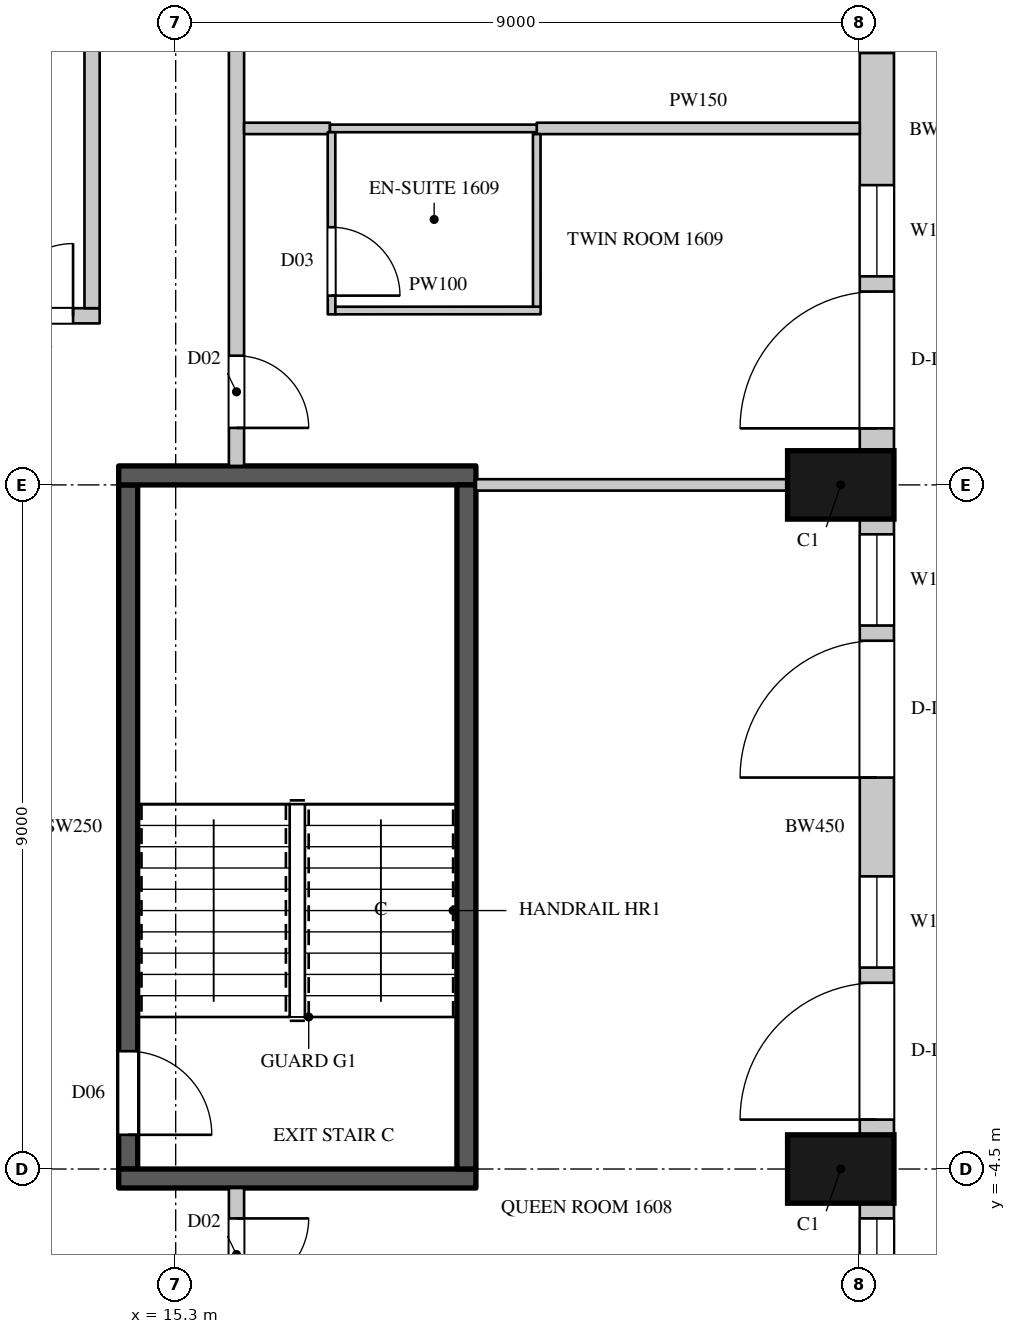
"""IFC4 building model, lengths in metres.
Left out: names, types, materials, properties, quantities, classifications, styles, units other than length and angle.
Written with IfcOpenShell. Run it as: python <this file> out.ifc"""

import sys

from ifc_helpers import new_model, si_unit, direction, frame, frame_2d, origin, origin_2d, place, context, subcontext, project, spatial, rectangle, extrude, element, fill, save


model = new_model("IFC4")
c1 = context("Model", 3, precision=1e-05, world=origin(), true_north=direction((0.0, 1.0)))
c2 = subcontext(c1, "Body", "Model", "MODEL_VIEW")
j1 = project(units=[si_unit("LENGTHUNIT", "METRE"), si_unit("PLANEANGLEUNIT", "RADIAN")], contexts=[c1])
p1 = place(None, origin())
s1 = spatial("IfcSite", under=j1, at=p1, CompositionType="ELEMENT")
p2 = place(p1, origin())
s2 = spatial("IfcBuilding", under=s1, at=p2, CompositionType="ELEMENT")
p3 = place(p2, frame((0.0, 0.0, 87.9)))
s3 = spatial("IfcBuildingStorey", under=s2, at=p3, CompositionType="ELEMENT", Elevation=87.9)
for number, where, z_axis, x_axis in (
    (1, (24.05, -4.5, 0.0), (0.0, 0.0, 1.0), (0.0, 1.0, 0.0)),
    (2, (24.05, 4.5, 0.0), (0.0, 0.0, 1.0), (0.0, 1.0, 0.0)),
):
    element("IfcColumn", number, at=place(p3, frame(where, z_axis=z_axis, x_axis=x_axis)), inside=s3, PredefinedType="COLUMN", context=c2, shape_type="SweptSolid", body=[
        extrude(rectangle(XDim=0.9, YDim=1.4, at=origin_2d()), origin(), (0.0, 0.0, 1.0), 3.6),
    ])
p4 = place(p3, frame((24.525, -13.05, 0.0), z_axis=(0.0, 0.0, 1.0), x_axis=(0.0, 1.0, 0.0)))
e3 = element("IfcWall", 3, at=p4, inside=s3, PredefinedType="SOLIDWALL", context=c2, shape_type="SweptSolid", body=[
    extrude(rectangle(XDim=8.1, YDim=0.45, at=frame_2d((4.05, 0.0))), origin(), (0.0, 0.0, 1.0), 3.3),
])
p5 = place(p4, frame((0.9, 0.0, 0.0)))
e4 = element("IfcOpeningElement", 4, at=p5, cuts=e3, PredefinedType="OPENING", context=c2, shape_type="SweptSolid", body=[
    extrude(rectangle(XDim=1.8, YDim=2.4, at=frame_2d((0.9, 1.2))), frame((0.0, 0.235, 0.0), z_axis=(0.0, -1.0, 0.0), x_axis=(1.0, 0.0, 0.0)), (0.0, 0.0, 1.0), 0.47),
])
p6 = place(p4, frame((4.7, 0.0, 0.0)))
e5 = element("IfcOpeningElement", 5, at=p6, cuts=e3, PredefinedType="OPENING", context=c2, shape_type="SweptSolid", body=[
    extrude(rectangle(XDim=1.8, YDim=2.4, at=frame_2d((0.9, 1.2))), frame((0.0, 0.235, 0.0), z_axis=(0.0, -1.0, 0.0), x_axis=(1.0, 0.0, 0.0)), (0.0, 0.0, 1.0), 0.47),
])
p7 = place(p4, frame((6.7, 0.0, 1.05)))
e6 = element("IfcOpeningElement", 6, at=p7, cuts=e3, PredefinedType="OPENING", context=c2, shape_type="SweptSolid", body=[
    extrude(rectangle(XDim=1.2, YDim=2.0, at=frame_2d((0.6, 1.0))), frame((0.0, 0.235, 0.0), z_axis=(0.0, -1.0, 0.0), x_axis=(1.0, 0.0, 0.0)), (0.0, 0.0, 1.0), 0.47),
])
p8 = place(p3, frame((24.525, -4.05, 0.0), z_axis=(0.0, 0.0, 1.0), x_axis=(0.0, 1.0, 0.0)))
e7 = element("IfcWall", 7, at=p8, inside=s3, PredefinedType="SOLIDWALL", context=c2, shape_type="SweptSolid", body=[
    extrude(rectangle(XDim=8.1, YDim=0.45, at=frame_2d((4.05, 0.0))), origin(), (0.0, 0.0, 1.0), 3.3),
])
p9 = place(p8, frame((0.2, 0.0, 0.0)))
e8 = element("IfcOpeningElement", 8, at=p9, cuts=e7, PredefinedType="OPENING", context=c2, shape_type="SweptSolid", body=[
    extrude(rectangle(XDim=1.8, YDim=2.4, at=frame_2d((0.9, 1.2))), frame((0.0, 0.235, 0.0), z_axis=(0.0, -1.0, 0.0), x_axis=(1.0, 0.0, 0.0)), (0.0, 0.0, 1.0), 0.47),
])
p10 = place(p8, frame((2.2, 0.0, 1.05)))
e9 = element("IfcOpeningElement", 9, at=p10, cuts=e7, PredefinedType="OPENING", context=c2, shape_type="SweptSolid", body=[
    extrude(rectangle(XDim=1.2, YDim=2.0, at=frame_2d((0.6, 1.0))), frame((0.0, 0.235, 0.0), z_axis=(0.0, -1.0, 0.0), x_axis=(1.0, 0.0, 0.0)), (0.0, 0.0, 1.0), 0.47),
])
p11 = place(p8, frame((4.7, 0.0, 0.0)))
e10 = element("IfcOpeningElement", 10, at=p11, cuts=e7, PredefinedType="OPENING", context=c2, shape_type="SweptSolid", body=[
    extrude(rectangle(XDim=1.8, YDim=2.4, at=frame_2d((0.9, 1.2))), frame((0.0, 0.235, 0.0), z_axis=(0.0, -1.0, 0.0), x_axis=(1.0, 0.0, 0.0)), (0.0, 0.0, 1.0), 0.47),
])
p12 = place(p8, frame((6.7, 0.0, 1.05)))
e11 = element("IfcOpeningElement", 11, at=p12, cuts=e7, PredefinedType="OPENING", context=c2, shape_type="SweptSolid", body=[
    extrude(rectangle(XDim=1.2, YDim=2.0, at=frame_2d((0.6, 1.0))), frame((0.0, 0.235, 0.0), z_axis=(0.0, -1.0, 0.0), x_axis=(1.0, 0.0, 0.0)), (0.0, 0.0, 1.0), 0.47),
])
p13 = place(p3, frame((24.525, 4.95, 0.0), z_axis=(0.0, 0.0, 1.0), x_axis=(0.0, 1.0, 0.0)))
e12 = element("IfcWall", 12, at=p13, inside=s3, PredefinedType="SOLIDWALL", context=c2, shape_type="SweptSolid", body=[
    extrude(rectangle(XDim=8.439, YDim=0.45, at=frame_2d((4.219, 0.0))), origin(), (0.0, 0.0, 1.0), 3.3),
])
p14 = place(p13, frame((0.294, 0.0, 0.0)))
e13 = element("IfcOpeningElement", 13, at=p14, cuts=e12, PredefinedType="OPENING", context=c2, shape_type="SweptSolid", body=[
    extrude(rectangle(XDim=1.8, YDim=2.4, at=frame_2d((0.9, 1.2))), frame((0.0, 0.235, 0.0), z_axis=(0.0, -1.0, 0.0), x_axis=(1.0, 0.0, 0.0)), (0.0, 0.0, 1.0), 0.47),
])
p15 = place(p13, frame((2.294, 0.0, 1.05)))
e14 = element("IfcOpeningElement", 14, at=p15, cuts=e12, PredefinedType="OPENING", context=c2, shape_type="SweptSolid", body=[
    extrude(rectangle(XDim=1.2, YDim=2.0, at=frame_2d((0.6, 1.0))), frame((0.0, 0.235, 0.0), z_axis=(0.0, -1.0, 0.0), x_axis=(1.0, 0.0, 0.0)), (0.0, 0.0, 1.0), 0.47),
])
p16 = place(p13, frame((5.232, 0.0, 1.05)))
e15 = element("IfcOpeningElement", 15, at=p16, cuts=e12, PredefinedType="OPENING", context=c2, shape_type="SweptSolid", body=[
    extrude(rectangle(XDim=2.7, YDim=2.0, at=frame_2d((1.35, 1.0))), frame((0.0, 0.235, 0.0), z_axis=(0.0, -1.0, 0.0), x_axis=(1.0, 0.0, 0.0)), (0.0, 0.0, 1.0), 0.47),
])
p17 = place(p3, frame((10.9, 6.725, 0.0), z_axis=(0.0, 0.0, 1.0), x_axis=(1.0, 0.0, 0.0)))
e16 = element("IfcWall", 16, at=p17, inside=s3, PredefinedType="PARTITIONING", context=c2, shape_type="SweptSolid", body=[
    extrude(rectangle(XDim=3.4, YDim=0.2, at=frame_2d((1.7, 0.0))), origin(), (0.0, 0.0, 1.0), 3.3),
])
p18 = place(p17, frame((2.1, 0.0, 0.0)))
e17 = element("IfcOpeningElement", 17, at=p18, cuts=e16, PredefinedType="OPENING", context=c2, shape_type="SweptSolid", body=[
    extrude(rectangle(XDim=0.95, YDim=2.2, at=frame_2d((0.475, 1.1))), frame((0.0, 0.11, 0.0), z_axis=(0.0, -1.0, 0.0), x_axis=(1.0, 0.0, 0.0)), (0.0, 0.0, 1.0), 0.22),
])
p19 = place(p3, frame((14.2, 6.825, 0.0), z_axis=(0.0, 0.0, 1.0), x_axis=(0.0, 1.0, 0.0)))
e18 = element("IfcWall", 18, at=p19, inside=s3, PredefinedType="PARTITIONING", context=c2, shape_type="SweptSolid", body=[
    extrude(rectangle(XDim=8.675, YDim=0.2, at=frame_2d((4.337, 0.0))), origin(), (0.0, 0.0, 1.0), 3.3),
])
p20 = place(p3, frame((16.1, -17.5, 0.0), z_axis=(0.0, 0.0, 1.0), x_axis=(0.0, 1.0, 0.0)))
e19 = element("IfcWall", 19, at=p20, inside=s3, PredefinedType="PARTITIONING", context=c2, shape_type="SweptSolid", body=[
    extrude(rectangle(XDim=12.75, YDim=0.2, at=frame_2d((6.375, 0.0))), origin(), (0.0, 0.0, 1.0), 3.3),
])
p21 = place(p20, frame((2.75, 0.0, 0.0)))
e20 = element("IfcOpeningElement", 20, at=p21, cuts=e19, PredefinedType="OPENING", context=c2, shape_type="SweptSolid", body=[
    extrude(rectangle(XDim=0.95, YDim=2.2, at=frame_2d((0.475, 1.1))), frame((0.0, 0.11, 0.0), z_axis=(0.0, -1.0, 0.0), x_axis=(1.0, 0.0, 0.0)), (0.0, 0.0, 1.0), 0.22),
])
p22 = place(p20, frame((6.95, 0.0, 0.0)))
e21 = element("IfcOpeningElement", 21, at=p22, cuts=e19, PredefinedType="OPENING", context=c2, shape_type="SweptSolid", body=[
    extrude(rectangle(XDim=0.95, YDim=2.2, at=frame_2d((0.475, 1.1))), frame((0.0, 0.11, 0.0), z_axis=(0.0, -1.0, 0.0), x_axis=(1.0, 0.0, 0.0)), (0.0, 0.0, 1.0), 0.22),
])
p23 = place(p20, frame((11.4, 0.0, 0.0)))
e22 = element("IfcOpeningElement", 22, at=p23, cuts=e19, PredefinedType="OPENING", context=c2, shape_type="SweptSolid", body=[
    extrude(rectangle(XDim=0.95, YDim=2.2, at=frame_2d((0.475, 1.1))), frame((0.0, 0.11, 0.0), z_axis=(0.0, -1.0, 0.0), x_axis=(1.0, 0.0, 0.0)), (0.0, 0.0, 1.0), 0.22),
])
p24 = place(p3, frame((16.1, 4.75, 0.0), z_axis=(0.0, 0.0, 1.0), x_axis=(0.0, 1.0, 0.0)))
e23 = element("IfcWall", 23, at=p24, inside=s3, PredefinedType="PARTITIONING", context=c2, shape_type="SweptSolid", body=[
    extrude(rectangle(XDim=12.65, YDim=0.2, at=frame_2d((6.325, 0.0))), origin(), (0.0, 0.0, 1.0), 3.3),
])
p25 = place(p24, frame((0.5, 0.0, 0.0)))
e24 = element("IfcOpeningElement", 24, at=p25, cuts=e23, PredefinedType="OPENING", context=c2, shape_type="SweptSolid", body=[
    extrude(rectangle(XDim=0.95, YDim=2.2, at=frame_2d((0.475, 1.1))), frame((0.0, 0.11, 0.0), z_axis=(0.0, -1.0, 0.0), x_axis=(1.0, 0.0, 0.0)), (0.0, 0.0, 1.0), 0.22),
])
p26 = place(p24, frame((6.9, 0.0, 0.0)))
e25 = element("IfcOpeningElement", 25, at=p26, cuts=e23, PredefinedType="OPENING", context=c2, shape_type="SweptSolid", body=[
    extrude(rectangle(XDim=0.95, YDim=2.2, at=frame_2d((0.475, 1.1))), frame((0.0, 0.11, 0.0), z_axis=(0.0, -1.0, 0.0), x_axis=(1.0, 0.0, 0.0)), (0.0, 0.0, 1.0), 0.22),
])
p27 = place(p3, frame((16.2, 9.19, 0.0), z_axis=(0.0, 0.0, 1.0), x_axis=(1.0, 0.0, 0.0)))
e26 = element("IfcWall", 26, at=p27, inside=s3, PredefinedType="PARTITIONING", context=c2, shape_type="SweptSolid", body=[
    extrude(rectangle(XDim=1.13, YDim=0.15, at=frame_2d((0.565, 0.0))), origin(), (0.0, 0.0, 1.0), 2.65),
])
p28 = place(p3, frame((19.25, 4.5, 0.0), z_axis=(0.0, 0.0, 1.0), x_axis=(1.0, 0.0, 0.0)))
e27 = element("IfcWall", 27, at=p28, inside=s3, PredefinedType="PARTITIONING", context=c2, shape_type="SweptSolid", body=[
    extrude(rectangle(XDim=4.1, YDim=0.15, at=frame_2d((2.05, 0.0))), origin(), (0.0, 0.0, 1.0), 3.3),
])
p29 = place(p3, frame((20.05, 9.19, 0.0), z_axis=(0.0, 0.0, 1.0), x_axis=(1.0, 0.0, 0.0)))
e28 = element("IfcWall", 28, at=p29, inside=s3, PredefinedType="PARTITIONING", context=c2, shape_type="SweptSolid", body=[
    extrude(rectangle(XDim=4.25, YDim=0.15, at=frame_2d((2.125, 0.0))), origin(), (0.0, 0.0, 1.0), 2.65),
])
p30 = place(p3, frame((14.675, -4.5, 0.0), z_axis=(0.0, 0.0, 1.0), x_axis=(0.0, 1.0, 0.0)))
e29 = element("IfcWall", 29, at=p30, inside=s3, PredefinedType="SHEAR", context=c2, shape_type="SweptSolid", body=[
    extrude(rectangle(XDim=9.0, YDim=0.25, at=frame_2d((4.5, 0.0))), origin(), (0.0, 0.0, 1.0), 3.3),
])
p31 = place(p30, frame((0.45, 0.0, 0.0)))
e30 = element("IfcOpeningElement", 30, at=p31, cuts=e29, PredefinedType="OPENING", context=c2, shape_type="SweptSolid", body=[
    extrude(rectangle(XDim=1.1, YDim=2.2, at=frame_2d((0.55, 1.1))), frame((0.0, 0.135, 0.0), z_axis=(0.0, -1.0, 0.0), x_axis=(1.0, 0.0, 0.0)), (0.0, 0.0, 1.0), 0.27),
])
for number, where, z_axis, x_axis in (
    (31, (14.55, -4.625, 0.0), (0.0, 0.0, 1.0), (1.0, 0.0, 0.0)),
    (32, (14.55, 4.625, 0.0), (0.0, 0.0, 1.0), (1.0, 0.0, 0.0)),
):
    element("IfcWall", number, at=place(p3, frame(where, z_axis=z_axis, x_axis=x_axis)), inside=s3, PredefinedType="SHEAR", context=c2, shape_type="SweptSolid", body=[
        extrude(rectangle(XDim=4.7, YDim=0.25, at=frame_2d((2.35, 0.0))), origin(), (0.0, 0.0, 1.0), 3.3),
    ])
p32 = place(p3, frame((19.125, -4.5, 0.0), z_axis=(0.0, 0.0, 1.0), x_axis=(0.0, 1.0, 0.0)))
e33 = element("IfcWall", 33, at=p32, inside=s3, PredefinedType="SHEAR", context=c2, shape_type="SweptSolid", body=[
    extrude(rectangle(XDim=9.0, YDim=0.25, at=frame_2d((4.5, 0.0))), origin(), (0.0, 0.0, 1.0), 3.3),
])
p33 = place(p3, frame((17.33, 9.19, 0.0), z_axis=(0.0, 0.0, 1.0), x_axis=(1.0, 0.0, 0.0)))
e34 = element("IfcWall", 34, at=p33, inside=s3, PredefinedType="PARTITIONING", context=c2, shape_type="SweptSolid", body=[
    extrude(rectangle(XDim=2.72, YDim=0.1, at=frame_2d((1.36, 0.0))), origin(), (0.0, 0.0, 1.0), 2.65),
])
p34 = place(p3, frame((17.35, 9.14, 0.0), z_axis=(0.0, 0.0, 1.0), x_axis=(0.000407580973, -0.999999916939, 0.0)))
e35 = element("IfcWall", 35, at=p34, inside=s3, PredefinedType="PARTITIONING", context=c2, shape_type="SweptSolid", body=[
    extrude(rectangle(XDim=2.396, YDim=0.1, at=frame_2d((1.198, 0.0))), origin(), (0.0, 0.0, 1.0), 3.3),
])
p35 = place(p34, frame((1.25, 0.0, 0.0)))
e36 = element("IfcOpeningElement", 36, at=p35, cuts=e35, PredefinedType="OPENING", context=c2, shape_type="SweptSolid", body=[
    extrude(rectangle(XDim=0.9, YDim=2.2, at=frame_2d((0.45, 1.1))), frame((0.0, 0.06, 0.0), z_axis=(0.0, -1.0, 0.0), x_axis=(1.0, 0.0, 0.0)), (0.0, 0.0, 1.0), 0.12),
])
p36 = place(p3, frame((17.401, 6.794, 0.0), z_axis=(0.0, 0.0, 1.0), x_axis=(0.9999999346, 0.000361663629, 0.0)))
e37 = element("IfcWall", 37, at=p36, inside=s3, PredefinedType="PARTITIONING", context=c2, shape_type="SweptSolid", body=[
    extrude(rectangle(XDim=2.7, YDim=0.1, at=frame_2d((1.35, 0.0))), origin(), (0.0, 0.0, 1.0), 3.3),
])
p37 = place(p3, frame((20.05, 9.115, 0.0), z_axis=(0.0, 0.0, 1.0), x_axis=(0.000430200003, -0.999999907464, 0.0)))
e38 = element("IfcWall", 38, at=p37, inside=s3, PredefinedType="PARTITIONING", context=c2, shape_type="SweptSolid", body=[
    extrude(rectangle(XDim=2.27, YDim=0.1, at=frame_2d((1.135, 0.0))), origin(), (0.0, 0.0, 1.0), 3.3),
])
p38 = place(p7, origin())
e39 = element("IfcWindow", 39, at=p38, inside=s3, PartitioningType="SINGLE_PANEL", PredefinedType="WINDOW", context=c2, shape_type="SweptSolid", body=[
    extrude(rectangle(XDim=1.2, YDim=2.0, at=frame_2d((0.6, 1.0))), frame((0.0, 0.135, 0.0), z_axis=(0.0, -1.0, 0.0), x_axis=(1.0, 0.0, 0.0)), (0.0, 0.0, 1.0), 0.06),
])
fill(e6, e39)
p39 = place(p9, origin())
e40 = element("IfcDoor", 40, at=p39, inside=s3, OperationType="SLIDING_TO_LEFT", PredefinedType="DOOR", context=c2, shape_type="SweptSolid", body=[
    extrude(rectangle(XDim=1.8, YDim=2.4, at=frame_2d((0.9, 1.2))), frame((0.0, 0.13, 0.0), z_axis=(0.0, -1.0, 0.0), x_axis=(1.0, 0.0, 0.0)), (0.0, 0.0, 1.0), 0.05),
])
fill(e8, e40)
p40 = place(p10, origin())
e41 = element("IfcWindow", 41, at=p40, inside=s3, PartitioningType="SINGLE_PANEL", PredefinedType="WINDOW", context=c2, shape_type="SweptSolid", body=[
    extrude(rectangle(XDim=1.2, YDim=2.0, at=frame_2d((0.6, 1.0))), frame((0.0, 0.135, 0.0), z_axis=(0.0, -1.0, 0.0), x_axis=(1.0, 0.0, 0.0)), (0.0, 0.0, 1.0), 0.06),
])
fill(e9, e41)
p41 = place(p11, origin())
e42 = element("IfcDoor", 42, at=p41, inside=s3, OperationType="SLIDING_TO_LEFT", PredefinedType="DOOR", context=c2, shape_type="SweptSolid", body=[
    extrude(rectangle(XDim=1.8, YDim=2.4, at=frame_2d((0.9, 1.2))), frame((0.0, 0.13, 0.0), z_axis=(0.0, -1.0, 0.0), x_axis=(1.0, 0.0, 0.0)), (0.0, 0.0, 1.0), 0.05),
])
fill(e10, e42)
p42 = place(p12, origin())
e43 = element("IfcWindow", 43, at=p42, inside=s3, PartitioningType="SINGLE_PANEL", PredefinedType="WINDOW", context=c2, shape_type="SweptSolid", body=[
    extrude(rectangle(XDim=1.2, YDim=2.0, at=frame_2d((0.6, 1.0))), frame((0.0, 0.135, 0.0), z_axis=(0.0, -1.0, 0.0), x_axis=(1.0, 0.0, 0.0)), (0.0, 0.0, 1.0), 0.06),
])
fill(e11, e43)
p43 = place(p14, origin())
e44 = element("IfcDoor", 44, at=p43, inside=s3, OperationType="SLIDING_TO_LEFT", PredefinedType="DOOR", context=c2, shape_type="SweptSolid", body=[
    extrude(rectangle(XDim=1.8, YDim=2.4, at=frame_2d((0.9, 1.2))), frame((0.0, 0.13, 0.0), z_axis=(0.0, -1.0, 0.0), x_axis=(1.0, 0.0, 0.0)), (0.0, 0.0, 1.0), 0.05),
])
fill(e13, e44)
p44 = place(p15, origin())
e45 = element("IfcWindow", 45, at=p44, inside=s3, PartitioningType="SINGLE_PANEL", PredefinedType="WINDOW", context=c2, shape_type="SweptSolid", body=[
    extrude(rectangle(XDim=1.2, YDim=2.0, at=frame_2d((0.6, 1.0))), frame((0.0, 0.135, 0.0), z_axis=(0.0, -1.0, 0.0), x_axis=(1.0, 0.0, 0.0)), (0.0, 0.0, 1.0), 0.06),
])
fill(e14, e45)
p45 = place(p16, origin())
e46 = element("IfcWindow", 46, at=p45, inside=s3, PartitioningType="SINGLE_PANEL", PredefinedType="WINDOW", context=c2, shape_type="SweptSolid", body=[
    extrude(rectangle(XDim=2.7, YDim=2.0, at=frame_2d((1.35, 1.0))), frame((0.0, 0.135, 0.0), z_axis=(0.0, -1.0, 0.0), x_axis=(1.0, 0.0, 0.0)), (0.0, 0.0, 1.0), 0.06),
])
fill(e15, e46)
p46 = place(p18, origin())
e47 = element("IfcDoor", 47, at=p46, inside=s3, OperationType="SINGLE_SWING_RIGHT", PredefinedType="DOOR", context=c2, shape_type="SweptSolid", body=[
    extrude(rectangle(XDim=0.95, YDim=2.2, at=frame_2d((0.475, 1.1))), frame((0.0, 0.025, 0.0), z_axis=(0.0, -1.0, 0.0), x_axis=(1.0, 0.0, 0.0)), (0.0, 0.0, 1.0), 0.05),
])
fill(e17, e47)
p47 = place(p23, origin())
e48 = element("IfcDoor", 48, at=p47, inside=s3, OperationType="SINGLE_SWING_LEFT", PredefinedType="DOOR", context=c2, shape_type="SweptSolid", body=[
    extrude(rectangle(XDim=0.95, YDim=2.2, at=frame_2d((0.475, 1.1))), frame((0.0, 0.025, 0.0), z_axis=(0.0, -1.0, 0.0), x_axis=(1.0, 0.0, 0.0)), (0.0, 0.0, 1.0), 0.05),
])
fill(e22, e48)
p48 = place(p25, origin())
e49 = element("IfcDoor", 49, at=p48, inside=s3, OperationType="SINGLE_SWING_RIGHT", PredefinedType="DOOR", context=c2, shape_type="SweptSolid", body=[
    extrude(rectangle(XDim=0.95, YDim=2.2, at=frame_2d((0.475, 1.1))), frame((0.0, 0.025, 0.0), z_axis=(0.0, -1.0, 0.0), x_axis=(1.0, 0.0, 0.0)), (0.0, 0.0, 1.0), 0.05),
])
fill(e24, e49)
p49 = place(p35, origin())
e50 = element("IfcDoor", 50, at=p49, inside=s3, OperationType="SINGLE_SWING_RIGHT", PredefinedType="DOOR", context=c2, shape_type="SweptSolid", body=[
    extrude(rectangle(XDim=0.9, YDim=2.2, at=frame_2d((0.45, 1.1))), frame((0.0, 0.025, 0.0), z_axis=(0.0, -1.0, 0.0), x_axis=(1.0, 0.0, 0.0)), (0.0, 0.0, 1.0), 0.05),
])
fill(e36, e50)
p50 = place(p31, origin())
e51 = element("IfcDoor", 51, at=p50, inside=s3, OperationType="SINGLE_SWING_RIGHT", PredefinedType="DOOR", context=c2, shape_type="SweptSolid", body=[
    extrude(rectangle(XDim=1.1, YDim=2.2, at=frame_2d((0.55, 1.1))), frame((0.0, 0.025, 0.0), z_axis=(0.0, -1.0, 0.0), x_axis=(1.0, 0.0, 0.0)), (0.0, 0.0, 1.0), 0.05),
])
fill(e30, e51)
save(model, sys.argv[1])
